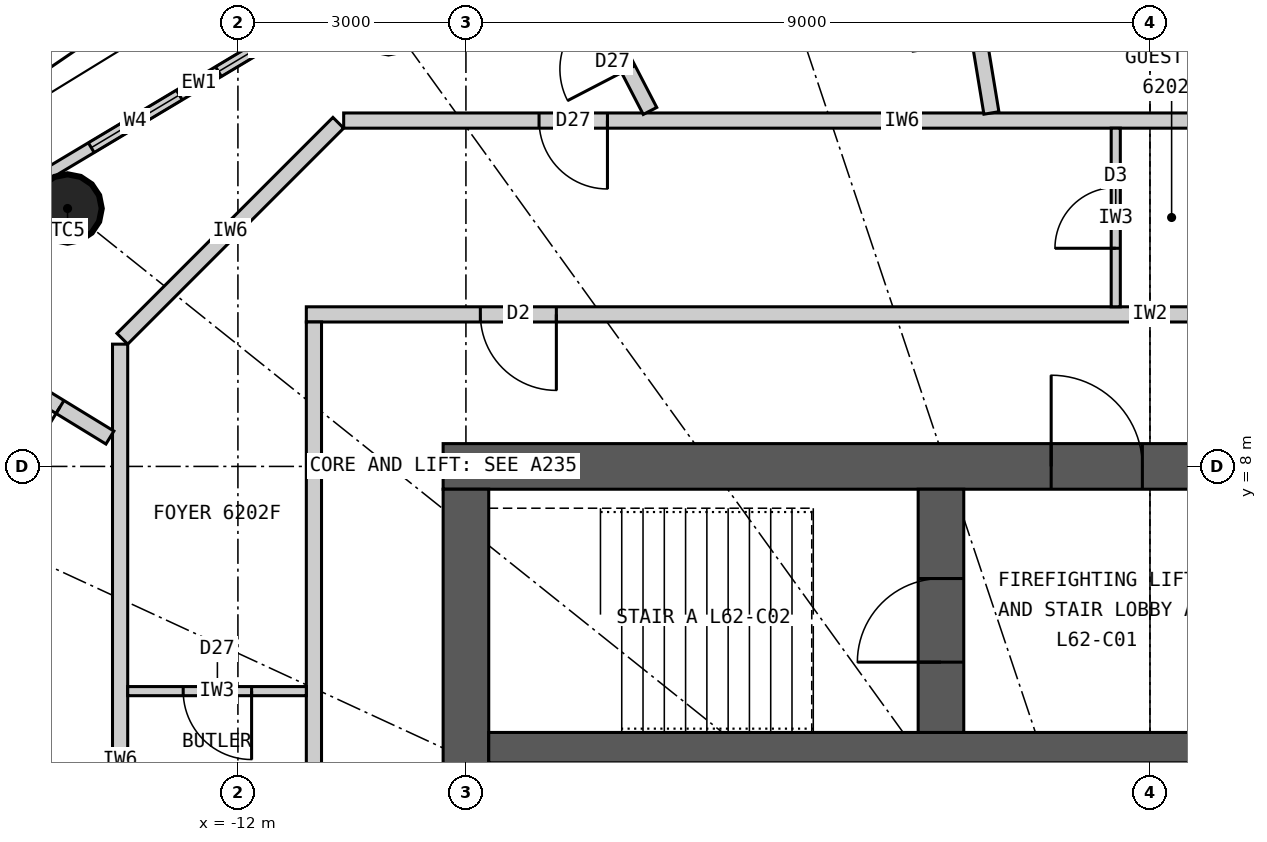
"""IFC4 building model, lengths in metres.
Left out: names, types, materials, properties, quantities, classifications, styles, units other than length and angle.
Written with IfcOpenShell. Run it as: python <this file> out.ifc"""

import sys

from ifc_helpers import new_model, si_unit, direction, frame, frame_2d, origin, origin_2d, place, context, subcontext, project, spatial, rectangle, circle, extrude, clip, halfspace, element, fill, save


model = new_model("IFC4")
c1 = context("Model", 3, precision=1e-05, world=origin(), true_north=direction((0.0, 1.0)))
c2 = subcontext(c1, "Body", "Model", "MODEL_VIEW")
j1 = project(units=[si_unit("LENGTHUNIT", "METRE"), si_unit("PLANEANGLEUNIT", "RADIAN")], contexts=[c1])
p1 = place(None, origin())
s1 = spatial("IfcSite", under=j1, at=p1, CompositionType="ELEMENT")
p2 = place(p1, origin())
s2 = spatial("IfcBuilding", under=s1, at=p2, CompositionType="ELEMENT")
p3 = place(p2, frame((0.0, 0.0, 229.2)))
s3 = spatial("IfcBuildingStorey", under=s2, at=p3, CompositionType="ELEMENT", Elevation=229.2)
for number, where, z_axis, x_axis in (
    (1, (-10.019, 13.883, 0.0), (0.0, 0.0, 1.0), (1.0, 0.0, 0.0)),
    (2, (-14.241, 11.393, 0.0), (0.0, 0.0, 1.0), (1.0, 0.0, 0.0)),
):
    element("IfcColumn", number, at=place(p3, frame(where, z_axis=z_axis, x_axis=x_axis)), inside=s3, PredefinedType="COLUMN", context=c2, shape_type="Clipping", body=[
        clip(extrude(circle(Radius=0.45, at=origin_2d()), origin(), (0.0, 0.0, 1.0), 3.3), halfspace(frame((0.0, 0.0, 2.25), z_axis=(0.0, 0.0, 1.0), x_axis=(1.0, 0.0, 0.0)), False)),
    ])
p4 = place(p3, frame((-9.3, 8.0, 0.0), z_axis=(0.0, 0.0, 1.0), x_axis=(1.0, 0.0, 0.0)))
e3 = element("IfcWall", 3, at=p4, inside=s3, PredefinedType="SHEAR", context=c2, shape_type="SweptSolid", body=[
    extrude(rectangle(XDim=18.6, YDim=0.6, at=frame_2d((9.3, 0.0))), origin(), (0.0, 0.0, 1.0), 3.3),
])
p5 = place(p4, frame((8.0, 0.0, 0.0)))
e4 = element("IfcOpeningElement", 4, at=p5, cuts=e3, PredefinedType="OPENING", context=c2, shape_type="SweptSolid", body=[
    extrude(rectangle(XDim=1.2, YDim=2.2, at=frame_2d((0.6, 1.1))), frame((0.0, 0.31, 0.0), z_axis=(0.0, -1.0, 0.0), x_axis=(1.0, 0.0, 0.0)), (0.0, 0.0, 1.0), 0.62),
])
p6 = place(p4, frame((15.6, 0.0, 0.0)))
e5 = element("IfcOpeningElement", 5, at=p6, cuts=e3, PredefinedType="OPENING", context=c2, shape_type="SweptSolid", body=[
    extrude(rectangle(XDim=0.9, YDim=2.2, at=frame_2d((0.45, 1.1))), frame((0.0, 0.31, 0.0), z_axis=(0.0, -1.0, 0.0), x_axis=(1.0, 0.0, 0.0)), (0.0, 0.0, 1.0), 0.62),
])
p7 = place(p3, frame((-9.0, 7.7, 0.0), z_axis=(0.0, 0.0, 1.0), x_axis=(0.0, -1.0, 0.0)))
e6 = element("IfcWall", 6, at=p7, inside=s3, PredefinedType="SHEAR", context=c2, shape_type="SweptSolid", body=[
    extrude(rectangle(XDim=15.4, YDim=0.6, at=frame_2d((7.7, 0.0))), origin(), (0.0, 0.0, 1.0), 3.3),
])
p8 = place(p7, frame((6.8, 0.0, 0.0)))
e7 = element("IfcOpeningElement", 7, at=p8, cuts=e6, PredefinedType="OPENING", context=c2, shape_type="SweptSolid", body=[
    extrude(rectangle(XDim=1.8, YDim=2.2, at=frame_2d((0.9, 1.1))), frame((0.0, 0.31, 0.0), z_axis=(0.0, -1.0, 0.0), x_axis=(1.0, 0.0, 0.0)), (0.0, 0.0, 1.0), 0.62),
])
p9 = place(p3, frame((-8.7, 4.3, 0.0), z_axis=(0.0, 0.0, 1.0), x_axis=(1.0, 0.0, 0.0)))
e8 = element("IfcWall", 8, at=p9, inside=s3, PredefinedType="SHEAR", context=c2, shape_type="SweptSolid", body=[
    extrude(rectangle(XDim=17.4, YDim=0.4, at=frame_2d((8.7, 0.0))), origin(), (0.0, 0.0, 1.0), 3.3),
])
p10 = place(p3, frame((-2.75, 4.5, 0.0), z_axis=(0.0, 0.0, 1.0), x_axis=(0.0, 1.0, 0.0)))
e9 = element("IfcWall", 9, at=p10, inside=s3, PredefinedType="SHEAR", context=c2, shape_type="SweptSolid", body=[
    extrude(rectangle(XDim=3.2, YDim=0.6, at=frame_2d((1.6, 0.0))), origin(), (0.0, 0.0, 1.0), 3.3),
])
p11 = place(p10, frame((0.925, 0.0, 0.0)))
e10 = element("IfcOpeningElement", 10, at=p11, cuts=e9, PredefinedType="OPENING", context=c2, shape_type="SweptSolid", body=[
    extrude(rectangle(XDim=1.1, YDim=2.2, at=frame_2d((0.55, 1.1))), frame((0.0, 0.31, 0.0), z_axis=(0.0, -1.0, 0.0), x_axis=(1.0, 0.0, 0.0)), (0.0, 0.0, 1.0), 0.62),
])
p12 = place(p3, frame((-10.346, 14.336, 0.0), z_axis=(0.0, 0.0, 1.0), x_axis=(-0.85822150553, -0.513279502265, 0.0)))
e11 = element("IfcWall", 11, at=p12, inside=s3, PredefinedType="ELEMENTEDWALL", context=c2, shape_type="SweptSolid", body=[
    extrude(rectangle(XDim=5.05, YDim=0.15, at=frame_2d((2.525, 0.0))), origin(), (0.0, 0.0, 1.0), 3.05),
])
p13 = place(p12, frame((0.875, 0.0, 0.9)))
e12 = element("IfcOpeningElement", 12, at=p13, cuts=e11, PredefinedType="OPENING", context=c2, shape_type="SweptSolid", body=[
    extrude(rectangle(XDim=1.35, YDim=1.9, at=frame_2d((0.675, 0.95))), frame((0.0, 0.085, 0.0), z_axis=(0.0, -1.0, 0.0), x_axis=(1.0, 0.0, 0.0)), (0.0, 0.0, 1.0), 0.17),
])
p14 = place(p12, frame((2.825, 0.0, 0.9)))
e13 = element("IfcOpeningElement", 13, at=p14, cuts=e11, PredefinedType="OPENING", context=c2, shape_type="SweptSolid", body=[
    extrude(rectangle(XDim=1.35, YDim=1.9, at=frame_2d((0.675, 0.95))), frame((0.0, 0.085, 0.0), z_axis=(0.0, -1.0, 0.0), x_axis=(1.0, 0.0, 0.0)), (0.0, 0.0, 1.0), 0.17),
])
p15 = place(p3, frame((-11.1, 10.0, 0.0), z_axis=(0.0, 0.0, 1.0), x_axis=(1.0, 0.0, 0.0)))
e14 = element("IfcWall", 14, at=p15, inside=s3, PredefinedType="PARTITIONING", context=c2, shape_type="SweptSolid", body=[
    extrude(rectangle(XDim=22.2, YDim=0.2, at=frame_2d((11.1, 0.0))), origin(), (0.0, 0.0, 1.0), 3.05),
])
p16 = place(p15, frame((2.29, 0.0, 0.0)))
e15 = element("IfcOpeningElement", 15, at=p16, cuts=e14, PredefinedType="OPENING", context=c2, shape_type="SweptSolid", body=[
    extrude(rectangle(XDim=1.0, YDim=2.2, at=frame_2d((0.5, 1.1))), frame((0.0, 0.11, 0.0), z_axis=(0.0, -1.0, 0.0), x_axis=(1.0, 0.0, 0.0)), (0.0, 0.0, 1.0), 0.22),
])
p17 = place(p3, frame((-11.0, 9.9, 0.0), z_axis=(0.0, 0.0, 1.0), x_axis=(0.0, -1.0, 0.0)))
e16 = element("IfcWall", 16, at=p17, inside=s3, PredefinedType="PARTITIONING", context=c2, shape_type="SweptSolid", body=[
    extrude(rectangle(XDim=19.8, YDim=0.2, at=frame_2d((9.9, 0.0))), origin(), (0.0, 0.0, 1.0), 3.05),
])
p18 = place(p17, frame((11.444, 0.0, 0.0)))
e17 = element("IfcOpeningElement", 17, at=p18, cuts=e16, PredefinedType="OPENING", context=c2, shape_type="SweptSolid", body=[
    extrude(rectangle(XDim=1.0, YDim=2.2, at=frame_2d((0.5, 1.1))), frame((0.0, 0.11, 0.0), z_axis=(0.0, -1.0, 0.0), x_axis=(1.0, 0.0, 0.0)), (0.0, 0.0, 1.0), 0.22),
])
p19 = place(p3, frame((4.082, 12.55, 0.0), z_axis=(0.0, 0.0, 1.0), x_axis=(-1.0, 0.0, 0.0)))
e18 = element("IfcWall", 18, at=p19, inside=s3, PredefinedType="PARTITIONING", context=c2, shape_type="SweptSolid", body=[
    extrude(rectangle(XDim=14.691, YDim=0.2, at=frame_2d((7.345, 0.0))), origin(), (0.0, 0.0, 1.0), 3.05),
])
p20 = place(p19, frame((2.102, 0.0, 0.0)))
e19 = element("IfcOpeningElement", 19, at=p20, cuts=e18, PredefinedType="OPENING", context=c2, shape_type="SweptSolid", body=[
    extrude(rectangle(XDim=0.8, YDim=2.1, at=frame_2d((0.4, 1.05))), frame((0.0, 0.11, 0.0), z_axis=(0.0, -1.0, 0.0), x_axis=(1.0, 0.0, 0.0)), (0.0, 0.0, 1.0), 0.22),
])
p21 = place(p19, frame((11.22, 0.0, 0.0)))
e20 = element("IfcOpeningElement", 20, at=p21, cuts=e18, PredefinedType="OPENING", context=c2, shape_type="SweptSolid", body=[
    extrude(rectangle(XDim=0.9, YDim=2.1, at=frame_2d((0.45, 1.05))), frame((0.0, 0.11, 0.0), z_axis=(0.0, -1.0, 0.0), x_axis=(1.0, 0.0, 0.0)), (0.0, 0.0, 1.0), 0.22),
])
p22 = place(p3, frame((-10.679, 12.521, 0.0), z_axis=(0.0, 0.0, 1.0), x_axis=(-0.707106781187, -0.707106781187, 0.0)))
e21 = element("IfcWall", 21, at=p22, inside=s3, PredefinedType="PARTITIONING", context=c2, shape_type="SweptSolid", body=[
    extrude(rectangle(XDim=4.019, YDim=0.2, at=frame_2d((2.009, 0.0))), origin(), (0.0, 0.0, 1.0), 3.05),
])
p23 = place(p3, frame((-13.55, 9.609, 0.0), z_axis=(0.0, 0.0, 1.0), x_axis=(0.0, -1.0, 0.0)))
e22 = element("IfcWall", 22, at=p23, inside=s3, PredefinedType="PARTITIONING", context=c2, shape_type="SweptSolid", body=[
    extrude(rectangle(XDim=10.93, YDim=0.2, at=frame_2d((5.465, 0.0))), origin(), (0.0, 0.0, 1.0), 3.05),
])
p24 = place(p23, frame((6.877, 0.0, 0.0)))
e23 = element("IfcOpeningElement", 23, at=p24, cuts=e22, PredefinedType="OPENING", context=c2, shape_type="SweptSolid", body=[
    extrude(rectangle(XDim=0.9, YDim=2.1, at=frame_2d((0.45, 1.05))), frame((0.0, 0.11, 0.0), z_axis=(0.0, -1.0, 0.0), x_axis=(1.0, 0.0, 0.0)), (0.0, 0.0, 1.0), 0.22),
])
p25 = place(p23, frame((8.565, 0.0, 0.0)))
e24 = element("IfcOpeningElement", 24, at=p25, cuts=e22, PredefinedType="OPENING", context=c2, shape_type="SweptSolid", body=[
    extrude(rectangle(XDim=0.8, YDim=2.1, at=frame_2d((0.4, 1.05))), frame((0.0, 0.11, 0.0), z_axis=(0.0, -1.0, 0.0), x_axis=(1.0, 0.0, 0.0)), (0.0, 0.0, 1.0), 0.22),
])
p26 = place(p3, frame((-2.086, 12.65, 0.0), z_axis=(0.0, 0.0, 1.0), x_axis=(-0.162664077359, 0.986681507852, 0.0)))
e25 = element("IfcWall", 25, at=p26, inside=s3, PredefinedType="PARTITIONING", context=c2, shape_type="SweptSolid", body=[
    extrude(rectangle(XDim=3.538, YDim=0.2, at=frame_2d((1.769, 0.0))), origin(), (0.0, 0.0, 1.0), 3.05),
])
p27 = place(p26, frame((0.97, 0.0, 0.0)))
e26 = element("IfcOpeningElement", 26, at=p27, cuts=e25, PredefinedType="OPENING", context=c2, shape_type="SweptSolid", body=[
    extrude(rectangle(XDim=0.9, YDim=2.1, at=frame_2d((0.45, 1.05))), frame((0.0, 0.11, 0.0), z_axis=(0.0, -1.0, 0.0), x_axis=(1.0, 0.0, 0.0)), (0.0, 0.0, 1.0), 0.22),
])
p28 = place(p3, frame((-6.578, 12.677, 0.0), z_axis=(0.0, 0.0, 1.0), x_axis=(-0.460620531465, 0.887597164255, 0.0)))
e27 = element("IfcWall", 27, at=p28, inside=s3, PredefinedType="PARTITIONING", context=c2, shape_type="SweptSolid", body=[
    extrude(rectangle(XDim=2.678, YDim=0.2, at=frame_2d((1.339, 0.0))), origin(), (0.0, 0.0, 1.0), 3.05),
])
p29 = place(p28, frame((0.62, 0.0, 0.0)))
e28 = element("IfcOpeningElement", 28, at=p29, cuts=e27, PredefinedType="OPENING", context=c2, shape_type="SweptSolid", body=[
    extrude(rectangle(XDim=0.9, YDim=2.1, at=frame_2d((0.45, 1.05))), frame((0.0, 0.11, 0.0), z_axis=(0.0, -1.0, 0.0), x_axis=(1.0, 0.0, 0.0)), (0.0, 0.0, 1.0), 0.22),
])
p30 = place(p3, frame((-13.684, 8.38, 0.0), z_axis=(0.0, 0.0, 1.0), x_axis=(-0.852784302627, 0.522263279576, 0.0)))
e29 = element("IfcWall", 29, at=p30, inside=s3, PredefinedType="PARTITIONING", context=c2, shape_type="SweptSolid", body=[
    extrude(rectangle(XDim=3.047, YDim=0.2, at=frame_2d((1.523, 0.0))), origin(), (0.0, 0.0, 1.0), 3.05),
])
p31 = place(p30, frame((0.77, 0.0, 0.0)))
e30 = element("IfcOpeningElement", 30, at=p31, cuts=e29, PredefinedType="OPENING", context=c2, shape_type="SweptSolid", body=[
    extrude(rectangle(XDim=0.9, YDim=2.1, at=frame_2d((0.45, 1.05))), frame((0.0, 0.11, 0.0), z_axis=(0.0, -1.0, 0.0), x_axis=(1.0, 0.0, 0.0)), (0.0, 0.0, 1.0), 0.22),
])
p32 = place(p3, frame((-13.655, 2.927, 0.0), z_axis=(0.0, 0.0, 1.0), x_axis=(-0.977790419294, 0.209585056568, 0.0)))
e31 = element("IfcWall", 31, at=p32, inside=s3, PredefinedType="PARTITIONING", context=c2, shape_type="SweptSolid", body=[
    extrude(rectangle(XDim=5.66, YDim=0.2, at=frame_2d((2.83, 0.0))), origin(), (0.0, 0.0, 1.0), 2.15),
])
p33 = place(p32, frame((1.82, 0.0, 0.0)))
e32 = element("IfcOpeningElement", 32, at=p33, cuts=e31, PredefinedType="OPENING", context=c2, shape_type="SweptSolid", body=[
    extrude(rectangle(XDim=0.9, YDim=2.1, at=frame_2d((0.45, 1.05))), frame((0.0, 0.11, 0.0), z_axis=(0.0, -1.0, 0.0), x_axis=(1.0, 0.0, 0.0)), (0.0, 0.0, 1.0), 0.22),
])
p34 = place(p3, frame((-0.45, 10.1, 0.0), z_axis=(0.0, 0.0, 1.0), x_axis=(0.0, 1.0, 0.0)))
e33 = element("IfcWall", 33, at=p34, inside=s3, PredefinedType="PARTITIONING", context=c2, shape_type="SweptSolid", body=[
    extrude(rectangle(XDim=2.35, YDim=0.12, at=frame_2d((1.175, 0.0))), origin(), (0.0, 0.0, 1.0), 3.05),
])
p35 = place(p34, frame((0.77, 0.0, 0.0)))
e34 = element("IfcOpeningElement", 34, at=p35, cuts=e33, PredefinedType="OPENING", context=c2, shape_type="SweptSolid", body=[
    extrude(rectangle(XDim=0.8, YDim=2.1, at=frame_2d((0.4, 1.05))), frame((0.0, 0.07, 0.0), z_axis=(0.0, -1.0, 0.0), x_axis=(1.0, 0.0, 0.0)), (0.0, 0.0, 1.0), 0.14),
])
p36 = place(p3, frame((-11.1, 5.044, 0.0), z_axis=(0.0, 0.0, 1.0), x_axis=(-1.0, 0.0, 0.0)))
e35 = element("IfcWall", 35, at=p36, inside=s3, PredefinedType="PARTITIONING", context=c2, shape_type="SweptSolid", body=[
    extrude(rectangle(XDim=2.35, YDim=0.12, at=frame_2d((1.175, 0.0))), origin(), (0.0, 0.0, 1.0), 3.05),
])
p37 = place(p36, frame((0.72, 0.0, 0.0)))
e36 = element("IfcOpeningElement", 36, at=p37, cuts=e35, PredefinedType="OPENING", context=c2, shape_type="SweptSolid", body=[
    extrude(rectangle(XDim=0.9, YDim=2.1, at=frame_2d((0.45, 1.05))), frame((0.0, 0.07, 0.0), z_axis=(0.0, -1.0, 0.0), x_axis=(1.0, 0.0, 0.0)), (0.0, 0.0, 1.0), 0.14),
])
p38 = place(p13, origin())
e37 = element("IfcWindow", 37, at=p38, inside=s3, PartitioningType="SINGLE_PANEL", PredefinedType="WINDOW", context=c2, shape_type="SweptSolid", body=[
    extrude(rectangle(XDim=1.35, YDim=1.9, at=frame_2d((0.675, 0.95))), frame((0.0, 0.03, 0.0), z_axis=(0.0, -1.0, 0.0), x_axis=(1.0, 0.0, 0.0)), (0.0, 0.0, 1.0), 0.06),
])
fill(e12, e37)
p39 = place(p14, origin())
e38 = element("IfcWindow", 38, at=p39, inside=s3, PartitioningType="SINGLE_PANEL", PredefinedType="WINDOW", context=c2, shape_type="SweptSolid", body=[
    extrude(rectangle(XDim=1.35, YDim=1.9, at=frame_2d((0.675, 0.95))), frame((0.0, 0.03, 0.0), z_axis=(0.0, -1.0, 0.0), x_axis=(1.0, 0.0, 0.0)), (0.0, 0.0, 1.0), 0.06),
])
fill(e13, e38)
p40 = place(p16, origin())
e39 = element("IfcDoor", 39, at=p40, inside=s3, OperationType="SINGLE_SWING_RIGHT", PredefinedType="DOOR", context=c2, shape_type="SweptSolid", body=[
    extrude(rectangle(XDim=1.0, YDim=2.2, at=frame_2d((0.5, 1.1))), frame((0.0, 0.025, 0.0), z_axis=(0.0, -1.0, 0.0), x_axis=(1.0, 0.0, 0.0)), (0.0, 0.0, 1.0), 0.05),
])
fill(e15, e39)
p41 = place(p35, origin())
e40 = element("IfcDoor", 40, at=p41, inside=s3, OperationType="SINGLE_SWING_LEFT", PredefinedType="DOOR", context=c2, shape_type="SweptSolid", body=[
    extrude(rectangle(XDim=0.8, YDim=2.1, at=frame_2d((0.4, 1.05))), frame((0.0, 0.025, 0.0), z_axis=(0.0, -1.0, 0.0), x_axis=(1.0, 0.0, 0.0)), (0.0, 0.0, 1.0), 0.05),
])
fill(e34, e40)
p42 = place(p37, origin())
e41 = element("IfcDoor", 41, at=p42, inside=s3, OperationType="SINGLE_SWING_LEFT", PredefinedType="DOOR", context=c2, shape_type="SweptSolid", body=[
    extrude(rectangle(XDim=0.9, YDim=2.1, at=frame_2d((0.45, 1.05))), frame((0.0, 0.025, 0.0), z_axis=(0.0, -1.0, 0.0), x_axis=(1.0, 0.0, 0.0)), (0.0, 0.0, 1.0), 0.05),
])
fill(e36, e41)
p43 = place(p21, origin())
e42 = element("IfcDoor", 42, at=p43, inside=s3, OperationType="SINGLE_SWING_LEFT", PredefinedType="DOOR", context=c2, shape_type="SweptSolid", body=[
    extrude(rectangle(XDim=0.9, YDim=2.1, at=frame_2d((0.45, 1.05))), frame((0.0, 0.025, 0.0), z_axis=(0.0, -1.0, 0.0), x_axis=(1.0, 0.0, 0.0)), (0.0, 0.0, 1.0), 0.05),
])
fill(e20, e42)
p44 = place(p29, origin())
e43 = element("IfcDoor", 43, at=p44, inside=s3, OperationType="SINGLE_SWING_LEFT", PredefinedType="DOOR", context=c2, shape_type="SweptSolid", body=[
    extrude(rectangle(XDim=0.9, YDim=2.1, at=frame_2d((0.45, 1.05))), frame((0.0, 0.025, 0.0), z_axis=(0.0, -1.0, 0.0), x_axis=(1.0, 0.0, 0.0)), (0.0, 0.0, 1.0), 0.05),
])
fill(e28, e43)
p45 = place(p31, origin())
e44 = element("IfcDoor", 44, at=p45, inside=s3, OperationType="SINGLE_SWING_LEFT", PredefinedType="DOOR", context=c2, shape_type="SweptSolid", body=[
    extrude(rectangle(XDim=0.9, YDim=2.1, at=frame_2d((0.45, 1.05))), frame((0.0, 0.025, 0.0), z_axis=(0.0, -1.0, 0.0), x_axis=(1.0, 0.0, 0.0)), (0.0, 0.0, 1.0), 0.05),
])
fill(e30, e44)
p46 = place(p5, origin())
e45 = element("IfcDoor", 45, at=p46, inside=s3, OperationType="SINGLE_SWING_LEFT", PredefinedType="DOOR", context=c2, shape_type="SweptSolid", body=[
    extrude(rectangle(XDim=1.2, YDim=2.2, at=frame_2d((0.6, 1.1))), frame((0.0, 0.025, 0.0), z_axis=(0.0, -1.0, 0.0), x_axis=(1.0, 0.0, 0.0)), (0.0, 0.0, 1.0), 0.05),
])
fill(e4, e45)
p47 = place(p11, origin())
e46 = element("IfcDoor", 46, at=p47, inside=s3, OperationType="SINGLE_SWING_LEFT", PredefinedType="DOOR", context=c2, shape_type="SweptSolid", body=[
    extrude(rectangle(XDim=1.1, YDim=2.2, at=frame_2d((0.55, 1.1))), frame((0.0, 0.025, 0.0), z_axis=(0.0, -1.0, 0.0), x_axis=(1.0, 0.0, 0.0)), (0.0, 0.0, 1.0), 0.05),
])
fill(e10, e46)
save(model, sys.argv[1])
